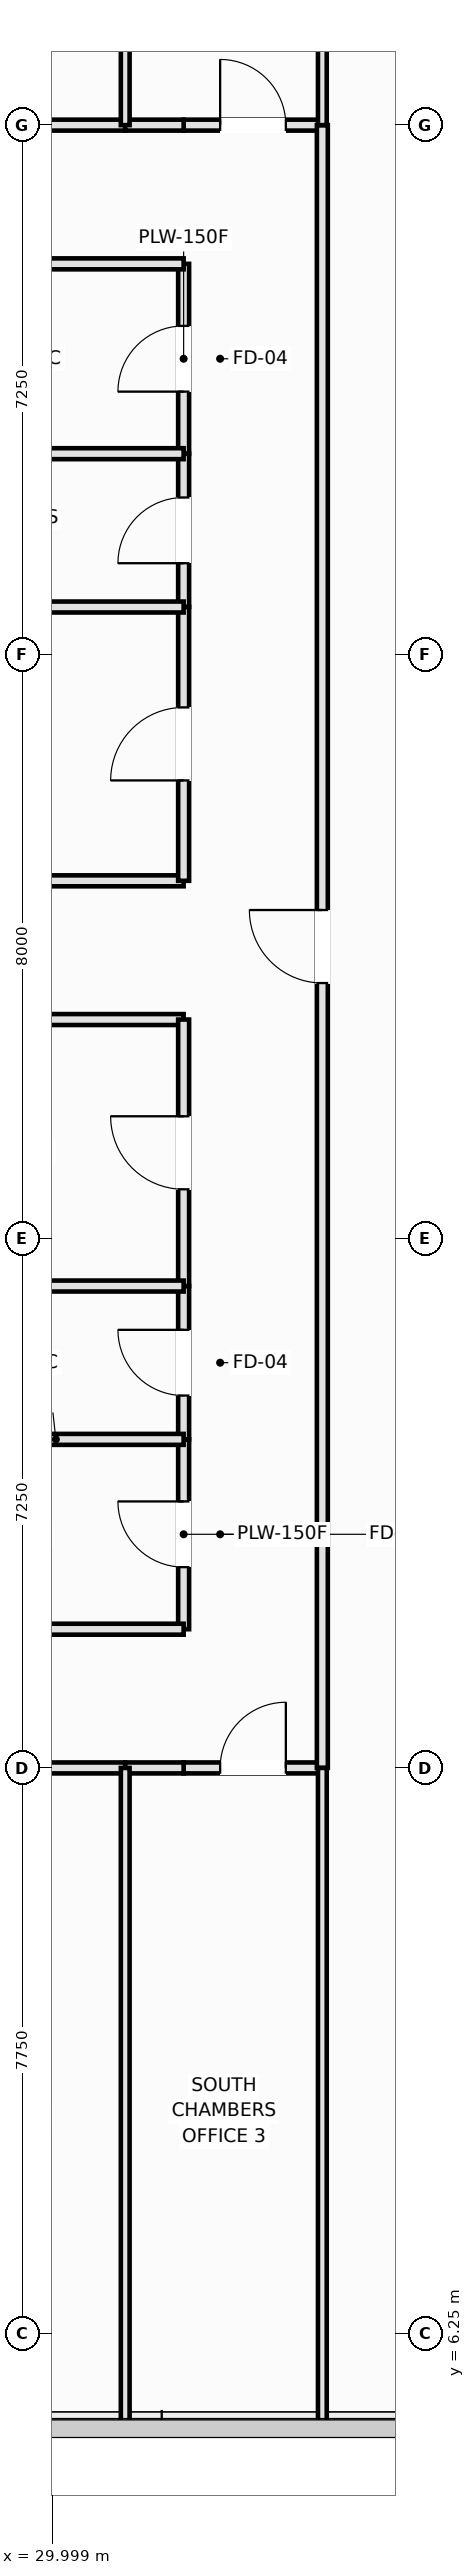
"""IFC4 building model, lengths in metres.
Left out: names, types, materials, properties, quantities, classifications, styles, units other than length and angle.
Written with IfcOpenShell. Run it as: python <this file> out.ifc"""

import sys

from ifc_helpers import new_model, si_unit, direction, frame, frame_2d, origin, place, context, subcontext, project, spatial, rectangle, extrude, element, fill, save


model = new_model("IFC4")
c1 = context("Model", 3, precision=1e-05, world=origin(), true_north=direction((0.0, 1.0)))
c2 = subcontext(c1, "Body", "Model", "MODEL_VIEW")
j1 = project(units=[si_unit("LENGTHUNIT", "METRE"), si_unit("PLANEANGLEUNIT", "RADIAN")], contexts=[c1])
p1 = place(None, origin())
s1 = spatial("IfcSite", under=j1, at=p1, CompositionType="ELEMENT")
p2 = place(p1, origin())
s2 = spatial("IfcBuilding", under=s1, at=p2, CompositionType="ELEMENT")
p3 = place(p2, frame((0.0, 0.0, 212.9)))
s3 = spatial("IfcBuildingStorey", under=s2, at=p3, CompositionType="ELEMENT", Elevation=212.9)
p4 = place(p3, frame((26.68, 24.25, 0.0), z_axis=(0.0, 0.0, 1.0), x_axis=(1.0, 0.0, 0.0)))
e1 = element("IfcWall", 1, at=p4, inside=s3, PredefinedType="PARTITIONING", context=c2, shape_type="SweptSolid", body=[
    extrude(rectangle(XDim=5.12, YDim=0.15, at=frame_2d((2.56, 0.0))), origin(), (0.0, 0.0, 1.0), 3.37),
])
p5 = place(p3, frame((24.78, 26.15, 0.0), z_axis=(0.0, 0.0, 1.0), x_axis=(1.0, 0.0, 0.0)))
e2 = element("IfcWall", 2, at=p5, inside=s3, PredefinedType="PARTITIONING", context=c2, shape_type="SweptSolid", body=[
    extrude(rectangle(XDim=7.02, YDim=0.15, at=frame_2d((3.51, 0.0))), origin(), (0.0, 0.0, 1.0), 3.37),
])
p6 = place(p3, frame((31.8, 15.9, 0.0), z_axis=(0.0, 0.0, 1.0), x_axis=(0.0, 1.0, 0.0)))
e3 = element("IfcWall", 3, at=p6, inside=s3, PredefinedType="PLUMBINGWALL", context=c2, shape_type="SweptSolid", body=[
    extrude(rectangle(XDim=2.6, YDim=0.15, at=frame_2d((1.3, 0.0))), origin(), (0.0, 0.0, 1.0), 3.37),
])
p7 = place(p6, frame((0.85, 0.0, 0.0)))
e4 = element("IfcOpeningElement", 4, at=p7, cuts=e3, PredefinedType="OPENING", context=c2, shape_type="SweptSolid", body=[
    extrude(rectangle(XDim=0.9, YDim=2.1, at=frame_2d((0.45, 1.05))), frame((0.0, 0.085, 0.0), z_axis=(0.0, -1.0, 0.0), x_axis=(1.0, 0.0, 0.0)), (0.0, 0.0, 1.0), 0.17),
])
p8 = place(p3, frame((31.8, 32.0, 0.0), z_axis=(0.0, 0.0, 1.0), x_axis=(0.0, 1.0, 0.0)))
e5 = element("IfcWall", 5, at=p8, inside=s3, PredefinedType="PLUMBINGWALL", context=c2, shape_type="SweptSolid", body=[
    extrude(rectangle(XDim=2.6, YDim=0.15, at=frame_2d((1.3, 0.0))), origin(), (0.0, 0.0, 1.0), 3.37),
])
p9 = place(p8, frame((0.85, 0.0, 0.0)))
e6 = element("IfcOpeningElement", 6, at=p9, cuts=e5, PredefinedType="OPENING", context=c2, shape_type="SweptSolid", body=[
    extrude(rectangle(XDim=0.9, YDim=2.1, at=frame_2d((0.45, 1.05))), frame((0.0, 0.085, 0.0), z_axis=(0.0, -1.0, 0.0), x_axis=(1.0, 0.0, 0.0)), (0.0, 0.0, 1.0), 0.17),
])
p10 = place(p3, frame((31.8, 18.5, 0.0), z_axis=(0.0, 0.0, 1.0), x_axis=(0.0, 1.0, 0.0)))
e7 = element("IfcWall", 7, at=p10, inside=s3, PredefinedType="PLUMBINGWALL", context=c2, shape_type="SweptSolid", body=[
    extrude(rectangle(XDim=2.1, YDim=0.15, at=frame_2d((1.05, 0.0))), origin(), (0.0, 0.0, 1.0), 3.37),
])
p11 = place(p10, frame((0.6, 0.0, 0.0)))
e8 = element("IfcOpeningElement", 8, at=p11, cuts=e7, PredefinedType="OPENING", context=c2, shape_type="SweptSolid", body=[
    extrude(rectangle(XDim=0.9, YDim=2.1, at=frame_2d((0.45, 1.05))), frame((0.0, 0.085, 0.0), z_axis=(0.0, -1.0, 0.0), x_axis=(1.0, 0.0, 0.0)), (0.0, 0.0, 1.0), 0.17),
])
p12 = place(p3, frame((31.8, 29.9, 0.0), z_axis=(0.0, 0.0, 1.0), x_axis=(0.0, 1.0, 0.0)))
e9 = element("IfcWall", 9, at=p12, inside=s3, PredefinedType="PLUMBINGWALL", context=c2, shape_type="SweptSolid", body=[
    extrude(rectangle(XDim=2.1, YDim=0.15, at=frame_2d((1.05, 0.0))), origin(), (0.0, 0.0, 1.0), 3.37),
])
p13 = place(p12, frame((0.6, 0.0, 0.0)))
e10 = element("IfcOpeningElement", 10, at=p13, cuts=e9, PredefinedType="OPENING", context=c2, shape_type="SweptSolid", body=[
    extrude(rectangle(XDim=0.9, YDim=2.1, at=frame_2d((0.45, 1.05))), frame((0.0, 0.085, 0.0), z_axis=(0.0, -1.0, 0.0), x_axis=(1.0, 0.0, 0.0)), (0.0, 0.0, 1.0), 0.17),
])
p14 = place(p3, frame((31.8, 20.6, 0.0), z_axis=(0.0, 0.0, 1.0), x_axis=(0.0, 1.0, 0.0)))
e11 = element("IfcWall", 11, at=p14, inside=s3, PredefinedType="PARTITIONING", context=c2, shape_type="SweptSolid", body=[
    extrude(rectangle(XDim=3.65, YDim=0.15, at=frame_2d((1.825, 0.0))), origin(), (0.0, 0.0, 1.0), 3.37),
])
p15 = place(p14, frame((1.325, 0.0, 0.0)))
e12 = element("IfcOpeningElement", 12, at=p15, cuts=e11, PredefinedType="OPENING", context=c2, shape_type="SweptSolid", body=[
    extrude(rectangle(XDim=1.0, YDim=2.15, at=frame_2d((0.5, 1.075))), frame((0.0, 0.085, 0.0), z_axis=(0.0, -1.0, 0.0), x_axis=(1.0, 0.0, 0.0)), (0.0, 0.0, 1.0), 0.17),
])
p16 = place(p3, frame((31.8, 26.15, 0.0), z_axis=(0.0, 0.0, 1.0), x_axis=(0.0, 1.0, 0.0)))
e13 = element("IfcWall", 13, at=p16, inside=s3, PredefinedType="PARTITIONING", context=c2, shape_type="SweptSolid", body=[
    extrude(rectangle(XDim=3.75, YDim=0.15, at=frame_2d((1.875, 0.0))), origin(), (0.0, 0.0, 1.0), 3.37),
])
p17 = place(p16, frame((1.375, 0.0, 0.0)))
e14 = element("IfcOpeningElement", 14, at=p17, cuts=e13, PredefinedType="OPENING", context=c2, shape_type="SweptSolid", body=[
    extrude(rectangle(XDim=1.0, YDim=2.15, at=frame_2d((0.5, 1.075))), frame((0.0, 0.085, 0.0), z_axis=(0.0, -1.0, 0.0), x_axis=(1.0, 0.0, 0.0)), (0.0, 0.0, 1.0), 0.17),
])
p18 = place(p3, frame((31.8, 14.0, 0.0), z_axis=(0.0, 0.0, 1.0), x_axis=(1.0, 0.0, 0.0)))
e15 = element("IfcWall", 15, at=p18, inside=s3, PredefinedType="PARTITIONING", context=c2, shape_type="SweptSolid", body=[
    extrude(rectangle(XDim=1.9, YDim=0.15, at=frame_2d((0.95, 0.0))), origin(), (0.0, 0.0, 1.0), 3.37),
])
p19 = place(p18, frame((0.5, 0.0, 0.0)))
e16 = element("IfcOpeningElement", 16, at=p19, cuts=e15, PredefinedType="OPENING", context=c2, shape_type="SweptSolid", body=[
    extrude(rectangle(XDim=0.9, YDim=2.1, at=frame_2d((0.45, 1.05))), frame((0.0, 0.085, 0.0), z_axis=(0.0, -1.0, 0.0), x_axis=(1.0, 0.0, 0.0)), (0.0, 0.0, 1.0), 0.17),
])
p20 = place(p3, frame((31.8, 36.5, 0.0), z_axis=(0.0, 0.0, 1.0), x_axis=(1.0, 0.0, 0.0)))
e17 = element("IfcWall", 17, at=p20, inside=s3, PredefinedType="PARTITIONING", context=c2, shape_type="SweptSolid", body=[
    extrude(rectangle(XDim=1.9, YDim=0.15, at=frame_2d((0.95, 0.0))), origin(), (0.0, 0.0, 1.0), 3.37),
])
p21 = place(p20, frame((0.5, 0.0, 0.0)))
e18 = element("IfcOpeningElement", 18, at=p21, cuts=e17, PredefinedType="OPENING", context=c2, shape_type="SweptSolid", body=[
    extrude(rectangle(XDim=0.9, YDim=2.1, at=frame_2d((0.45, 1.05))), frame((0.0, 0.085, 0.0), z_axis=(0.0, -1.0, 0.0), x_axis=(1.0, 0.0, 0.0)), (0.0, 0.0, 1.0), 0.17),
])
p22 = place(p3, frame((33.7, 14.0, 0.0), z_axis=(0.0, 0.0, 1.0), x_axis=(0.0, 1.0, 0.0)))
e19 = element("IfcWall", 19, at=p22, inside=s3, PredefinedType="PARTITIONING", context=c2, shape_type="SweptSolid", body=[
    extrude(rectangle(XDim=22.5, YDim=0.15, at=frame_2d((11.25, 0.0))), origin(), (0.0, 0.0, 1.0), 3.37),
])
p23 = place(p22, frame((10.75, 0.0, 0.0)))
e20 = element("IfcOpeningElement", 20, at=p23, cuts=e19, PredefinedType="OPENING", context=c2, shape_type="SweptSolid", body=[
    extrude(rectangle(XDim=1.0, YDim=2.15, at=frame_2d((0.5, 1.075))), frame((0.0, 0.085, 0.0), z_axis=(0.0, -1.0, 0.0), x_axis=(1.0, 0.0, 0.0)), (0.0, 0.0, 1.0), 0.17),
])
p24 = place(p3, frame((28.3, 15.9, 0.0), z_axis=(0.0, 0.0, 1.0), x_axis=(1.0, 0.0, 0.0)))
e21 = element("IfcWall", 21, at=p24, inside=s3, PredefinedType="PLUMBINGWALL", context=c2, shape_type="SweptSolid", body=[
    extrude(rectangle(XDim=3.5, YDim=0.15, at=frame_2d((1.75, 0.0))), origin(), (0.0, 0.0, 1.0), 3.37),
])
p25 = place(p3, frame((27.5, 14.0, 0.0), z_axis=(0.0, 0.0, 1.0), x_axis=(1.0, 0.0, 0.0)))
e22 = element("IfcWall", 22, at=p25, inside=s3, PredefinedType="PARTITIONING", context=c2, shape_type="SweptSolid", body=[
    extrude(rectangle(XDim=3.5, YDim=0.15, at=frame_2d((1.75, 0.0))), origin(), (0.0, 0.0, 1.0), 3.37),
])
p26 = place(p25, frame((1.25, 0.0, 0.0)))
e23 = element("IfcOpeningElement", 23, at=p26, cuts=e22, PredefinedType="OPENING", context=c2, shape_type="SweptSolid", body=[
    extrude(rectangle(XDim=1.0, YDim=2.15, at=frame_2d((0.5, 1.075))), frame((0.0, 0.085, 0.0), z_axis=(0.0, -1.0, 0.0), x_axis=(1.0, 0.0, 0.0)), (0.0, 0.0, 1.0), 0.17),
])
p27 = place(p3, frame((31.0, 14.0, 0.0), z_axis=(0.0, 0.0, 1.0), x_axis=(1.0, 0.0, 0.0)))
e24 = element("IfcWall", 24, at=p27, inside=s3, PredefinedType="PARTITIONING", context=c2, shape_type="SweptSolid", body=[
    extrude(rectangle(XDim=0.8, YDim=0.15, at=frame_2d((0.4, 0.0))), origin(), (0.0, 0.0, 1.0), 3.37),
])
p28 = place(p3, frame((28.3, 34.6, 0.0), z_axis=(0.0, 0.0, 1.0), x_axis=(1.0, 0.0, 0.0)))
e25 = element("IfcWall", 25, at=p28, inside=s3, PredefinedType="PLUMBINGWALL", context=c2, shape_type="SweptSolid", body=[
    extrude(rectangle(XDim=3.5, YDim=0.15, at=frame_2d((1.75, 0.0))), origin(), (0.0, 0.0, 1.0), 3.37),
])
p29 = place(p3, frame((27.5, 36.5, 0.0), z_axis=(0.0, 0.0, 1.0), x_axis=(1.0, 0.0, 0.0)))
e26 = element("IfcWall", 26, at=p29, inside=s3, PredefinedType="PARTITIONING", context=c2, shape_type="SweptSolid", body=[
    extrude(rectangle(XDim=3.5, YDim=0.15, at=frame_2d((1.75, 0.0))), origin(), (0.0, 0.0, 1.0), 3.37),
])
p30 = place(p29, frame((1.25, 0.0, 0.0)))
e27 = element("IfcOpeningElement", 27, at=p30, cuts=e26, PredefinedType="OPENING", context=c2, shape_type="SweptSolid", body=[
    extrude(rectangle(XDim=1.0, YDim=2.15, at=frame_2d((0.5, 1.075))), frame((0.0, 0.085, 0.0), z_axis=(0.0, -1.0, 0.0), x_axis=(1.0, 0.0, 0.0)), (0.0, 0.0, 1.0), 0.17),
])
p31 = place(p3, frame((31.0, 36.5, 0.0), z_axis=(0.0, 0.0, 1.0), x_axis=(1.0, 0.0, 0.0)))
e28 = element("IfcWall", 28, at=p31, inside=s3, PredefinedType="PARTITIONING", context=c2, shape_type="SweptSolid", body=[
    extrude(rectangle(XDim=0.8, YDim=0.15, at=frame_2d((0.4, 0.0))), origin(), (0.0, 0.0, 1.0), 3.37),
])
for number, where, z_axis, x_axis in (
    (29, (28.3, 18.5, 0.0), (0.0, 0.0, 1.0), (1.0, 0.0, 0.0)),
    (30, (28.3, 32.0, 0.0), (0.0, 0.0, 1.0), (1.0, 0.0, 0.0)),
):
    element("IfcWall", number, at=place(p3, frame(where, z_axis=z_axis, x_axis=x_axis)), inside=s3, PredefinedType="PLUMBINGWALL", context=c2, shape_type="SweptSolid", body=[
        extrude(rectangle(XDim=3.5, YDim=0.15, at=frame_2d((1.75, 0.0))), origin(), (0.0, 0.0, 1.0), 2.87),
    ])
for number, where, z_axis, x_axis in (
    (31, (28.3, 20.6, 0.0), (0.0, 0.0, 1.0), (1.0, 0.0, 0.0)),
    (32, (28.3, 29.9, 0.0), (0.0, 0.0, 1.0), (1.0, 0.0, 0.0)),
):
    element("IfcWall", number, at=place(p3, frame(where, z_axis=z_axis, x_axis=x_axis)), inside=s3, PredefinedType="PLUMBINGWALL", context=c2, shape_type="SweptSolid", body=[
        extrude(rectangle(XDim=3.5, YDim=0.15, at=frame_2d((1.75, 0.0))), origin(), (0.0, 0.0, 1.0), 3.37),
    ])
for number, where, z_axis, x_axis in (
    (33, (31.0, 5.01, 0.0), (0.0, 0.0, 1.0), (0.0, 1.0, 0.0)),
    (34, (33.7, 5.01, 0.0), (0.0, 0.0, 1.0), (0.0, 1.0, 0.0)),
    (35, (31.0, 36.5, 0.0), (0.0, 0.0, 1.0), (0.0, 1.0, 0.0)),
    (36, (33.7, 36.5, 0.0), (0.0, 0.0, 1.0), (0.0, 1.0, 0.0)),
):
    element("IfcWall", number, at=place(p3, frame(where, z_axis=z_axis, x_axis=x_axis)), inside=s3, PredefinedType="PARTITIONING", context=c2, shape_type="SweptSolid", body=[
        extrude(rectangle(XDim=8.99, YDim=0.12, at=frame_2d((4.495, 0.0))), origin(), (0.0, 0.0, 1.0), 3.37),
    ])
p32 = place(p7, origin())
e37 = element("IfcDoor", 37, at=p32, inside=s3, OperationType="SINGLE_SWING_RIGHT", PredefinedType="DOOR", context=c2, shape_type="SweptSolid", body=[
    extrude(rectangle(XDim=0.9, YDim=2.1, at=frame_2d((0.45, 1.05))), frame((0.0, 0.025, 0.0), z_axis=(0.0, -1.0, 0.0), x_axis=(1.0, 0.0, 0.0)), (0.0, 0.0, 1.0), 0.05),
])
fill(e4, e37)
p33 = place(p9, origin())
e38 = element("IfcDoor", 38, at=p33, inside=s3, OperationType="SINGLE_SWING_LEFT", PredefinedType="DOOR", context=c2, shape_type="SweptSolid", body=[
    extrude(rectangle(XDim=0.9, YDim=2.1, at=frame_2d((0.45, 1.05))), frame((0.0, 0.025, 0.0), z_axis=(0.0, -1.0, 0.0), x_axis=(1.0, 0.0, 0.0)), (0.0, 0.0, 1.0), 0.05),
])
fill(e6, e38)
p34 = place(p11, origin())
e39 = element("IfcDoor", 39, at=p34, inside=s3, OperationType="SINGLE_SWING_RIGHT", PredefinedType="DOOR", context=c2, shape_type="SweptSolid", body=[
    extrude(rectangle(XDim=0.9, YDim=2.1, at=frame_2d((0.45, 1.05))), frame((0.0, 0.025, 0.0), z_axis=(0.0, -1.0, 0.0), x_axis=(1.0, 0.0, 0.0)), (0.0, 0.0, 1.0), 0.05),
])
fill(e8, e39)
p35 = place(p13, origin())
e40 = element("IfcDoor", 40, at=p35, inside=s3, OperationType="SINGLE_SWING_LEFT", PredefinedType="DOOR", context=c2, shape_type="SweptSolid", body=[
    extrude(rectangle(XDim=0.9, YDim=2.1, at=frame_2d((0.45, 1.05))), frame((0.0, 0.025, 0.0), z_axis=(0.0, -1.0, 0.0), x_axis=(1.0, 0.0, 0.0)), (0.0, 0.0, 1.0), 0.05),
])
fill(e10, e40)
p36 = place(p15, origin())
e41 = element("IfcDoor", 41, at=p36, inside=s3, OperationType="SINGLE_SWING_RIGHT", PredefinedType="DOOR", context=c2, shape_type="SweptSolid", body=[
    extrude(rectangle(XDim=1.0, YDim=2.15, at=frame_2d((0.5, 1.075))), frame((0.0, 0.025, 0.0), z_axis=(0.0, -1.0, 0.0), x_axis=(1.0, 0.0, 0.0)), (0.0, 0.0, 1.0), 0.05),
])
fill(e12, e41)
p37 = place(p17, origin())
e42 = element("IfcDoor", 42, at=p37, inside=s3, OperationType="SINGLE_SWING_LEFT", PredefinedType="DOOR", context=c2, shape_type="SweptSolid", body=[
    extrude(rectangle(XDim=1.0, YDim=2.15, at=frame_2d((0.5, 1.075))), frame((0.0, 0.025, 0.0), z_axis=(0.0, -1.0, 0.0), x_axis=(1.0, 0.0, 0.0)), (0.0, 0.0, 1.0), 0.05),
])
fill(e14, e42)
p38 = place(p19, origin())
e43 = element("IfcDoor", 43, at=p38, inside=s3, OperationType="SINGLE_SWING_RIGHT", PredefinedType="DOOR", context=c2, shape_type="SweptSolid", body=[
    extrude(rectangle(XDim=0.9, YDim=2.1, at=frame_2d((0.45, 1.05))), frame((0.0, 0.025, 0.0), z_axis=(0.0, -1.0, 0.0), x_axis=(1.0, 0.0, 0.0)), (0.0, 0.0, 1.0), 0.05),
])
fill(e16, e43)
p39 = place(p21, origin())
e44 = element("IfcDoor", 44, at=p39, inside=s3, OperationType="SINGLE_SWING_LEFT", PredefinedType="DOOR", context=c2, shape_type="SweptSolid", body=[
    extrude(rectangle(XDim=0.9, YDim=2.1, at=frame_2d((0.45, 1.05))), frame((0.0, 0.025, 0.0), z_axis=(0.0, -1.0, 0.0), x_axis=(1.0, 0.0, 0.0)), (0.0, 0.0, 1.0), 0.05),
])
fill(e18, e44)
p40 = place(p23, origin())
e45 = element("IfcDoor", 45, at=p40, inside=s3, OperationType="SINGLE_SWING_RIGHT", PredefinedType="DOOR", context=c2, shape_type="SweptSolid", body=[
    extrude(rectangle(XDim=1.0, YDim=2.15, at=frame_2d((0.5, 1.075))), frame((0.0, 0.025, 0.0), z_axis=(0.0, -1.0, 0.0), x_axis=(1.0, 0.0, 0.0)), (0.0, 0.0, 1.0), 0.05),
])
fill(e20, e45)
save(model, sys.argv[1])
